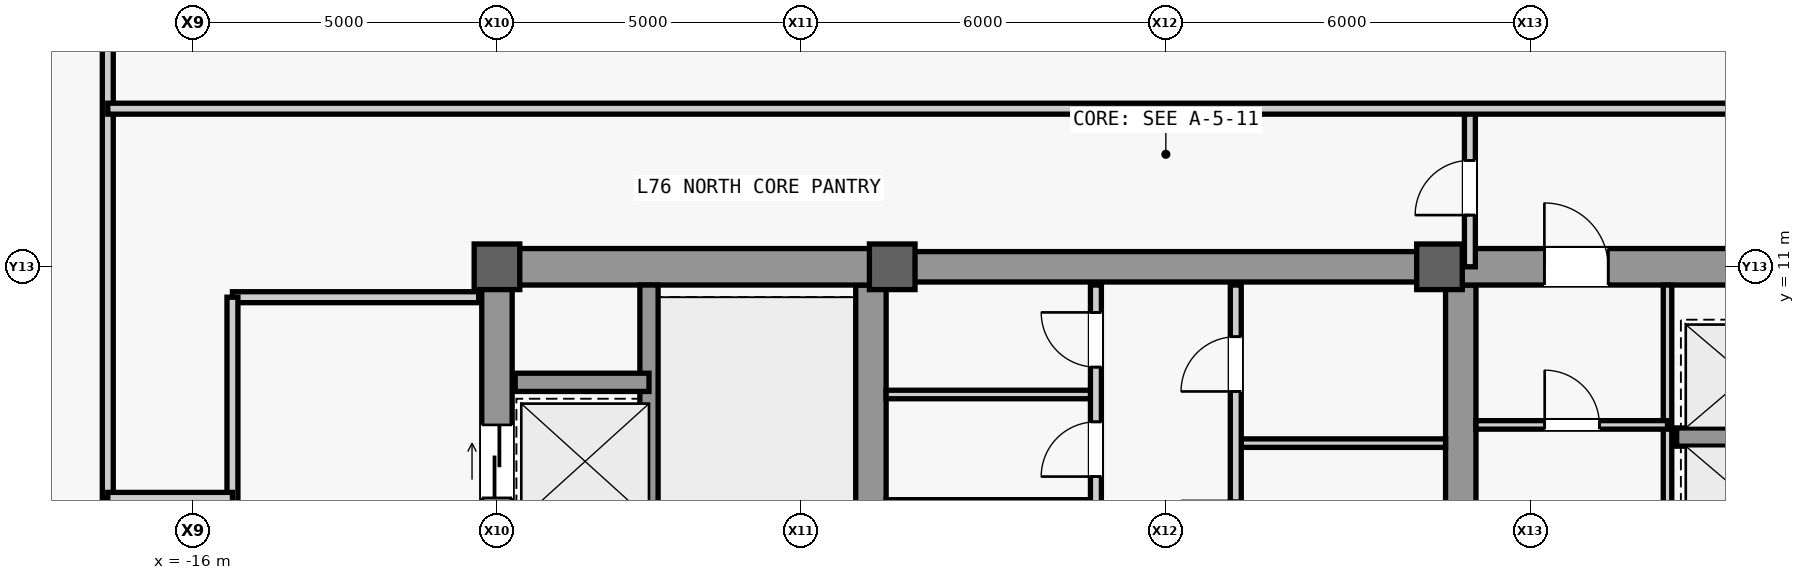
"""IFC4 building model, lengths in metres.
Left out: names, types, materials, properties, quantities, classifications, styles, units other than length and angle.
Written with IfcOpenShell. Run it as: python <this file> out.ifc"""

import sys

from ifc_helpers import new_model, si_unit, direction, frame, frame_2d, origin, origin_2d, place, context, subcontext, project, spatial, rectangle, extrude, source, transform, mapped, element, fill, save


model = new_model("IFC4")
c1 = context("Model", 3, precision=1e-05, world=origin(), true_north=direction((0.0, 1.0)))
c2 = subcontext(c1, "Body", "Model", "MODEL_VIEW")
j1 = project(units=[si_unit("LENGTHUNIT", "METRE"), si_unit("PLANEANGLEUNIT", "RADIAN")], contexts=[c1])
p1 = place(None, origin())
s1 = spatial("IfcSite", under=j1, at=p1, CompositionType="ELEMENT")
p2 = place(p1, origin())
s2 = spatial("IfcBuilding", under=s1, at=p2, CompositionType="ELEMENT")
p3 = place(p2, frame((0.0, 0.0, 321.5)))
s3 = spatial("IfcBuildingStorey", under=s2, at=p3, CompositionType="ELEMENT", Elevation=321.5)
m1 = source(origin(), c2, "Body", "SweptSolid", [
    extrude(rectangle(XDim=22.0, YDim=0.5, at=frame_2d((11.0, 0.0))), origin(), (0.0, 0.0, 1.0), 4.54),
])
p4 = place(p3, frame((-11.0, -11.0, 0.0), z_axis=(0.0, 0.0, 1.0), x_axis=(0.0, 1.0, 0.0)))
e1 = element("IfcWall", 1, at=p4, inside=s3, PredefinedType="SHEAR", context=c2, shape_type="MappedRepresentation", body=[
    mapped(m1, transform((0.0, 0.0, 0.0), scale=1.0)),
])
m2 = source(origin(), c2, "Body", "SweptSolid", [
    extrude(rectangle(XDim=1.1, YDim=2.2, at=frame_2d((0.55, 1.1))), frame((0.0, 0.26, 0.0), z_axis=(0.0, -1.0, 0.0), x_axis=(1.0, 0.0, 0.0)), (0.0, 0.0, 1.0), 0.52),
])
p5 = place(p4, frame((0.8, 0.0, 0.0)))
e2 = element("IfcOpeningElement", 2, at=p5, cuts=e1, PredefinedType="OPENING", context=c2, shape_type="MappedRepresentation", body=[
    mapped(m2, transform((0.0, 0.0, 0.0), scale=1.0)),
])
p6 = place(p4, frame((12.5, 0.0, 0.0)))
e3 = element("IfcOpeningElement", 3, at=p6, cuts=e1, PredefinedType="OPENING", context=c2, shape_type="MappedRepresentation", body=[
    mapped(m2, transform((0.0, 0.0, 0.0), scale=1.0)),
])
m3 = source(origin(), c2, "Body", "SweptSolid", [
    extrude(rectangle(XDim=0.9, YDim=2.15, at=frame_2d((0.45, 1.075))), frame((0.0, 0.26, 0.0), z_axis=(0.0, -1.0, 0.0), x_axis=(1.0, 0.0, 0.0)), (0.0, 0.0, 1.0), 0.52),
])
p7 = place(p4, frame((6.2, 0.0, 0.0)))
e4 = element("IfcOpeningElement", 4, at=p7, cuts=e1, PredefinedType="OPENING", context=c2, shape_type="MappedRepresentation", body=[
    mapped(m3, transform((0.0, 0.0, 0.0), scale=1.0)),
])
p8 = place(p4, frame((8.525, 0.0, 0.0)))
e5 = element("IfcOpeningElement", 5, at=p8, cuts=e1, PredefinedType="OPENING", context=c2, shape_type="MappedRepresentation", body=[
    mapped(m3, transform((0.0, 0.0, 0.0), scale=1.0)),
])
m4 = source(origin(), c2, "Body", "SweptSolid", [
    extrude(rectangle(XDim=1.2, YDim=2.3, at=frame_2d((0.6, 1.15))), frame((0.0, 0.26, 0.0), z_axis=(0.0, -1.0, 0.0), x_axis=(1.0, 0.0, 0.0)), (0.0, 0.0, 1.0), 0.52),
])
p9 = place(p4, frame((14.6, 0.0, 0.0)))
e6 = element("IfcOpeningElement", 6, at=p9, cuts=e1, PredefinedType="OPENING", context=c2, shape_type="MappedRepresentation", body=[
    mapped(m4, transform((0.0, 0.0, 0.0), scale=1.0)),
])
p10 = place(p4, frame((18.2, 0.0, 0.0)))
e7 = element("IfcOpeningElement", 7, at=p10, cuts=e1, PredefinedType="OPENING", context=c2, shape_type="MappedRepresentation", body=[
    mapped(m4, transform((0.0, 0.0, 0.0), scale=1.0)),
])
m5 = source(origin(), c2, "Body", "SweptSolid", [
    extrude(rectangle(XDim=1.3, YDim=2.3, at=frame_2d((0.65, 1.15))), frame((0.0, 0.26, 0.0), z_axis=(0.0, -1.0, 0.0), x_axis=(1.0, 0.0, 0.0)), (0.0, 0.0, 1.0), 0.52),
])
p11 = place(p4, frame((2.7, 0.0, 0.0)))
e8 = element("IfcOpeningElement", 8, at=p11, cuts=e1, PredefinedType="OPENING", context=c2, shape_type="MappedRepresentation", body=[
    mapped(m5, transform((0.0, 0.0, 0.0), scale=1.0)),
])
m6 = source(origin(), c2, "Body", "SweptSolid", [
    extrude(rectangle(XDim=21.4, YDim=0.5, at=frame_2d((10.7, 0.0))), origin(), (0.0, 0.0, 1.0), 4.54),
])
for number, where, z_axis, x_axis in (
    (9, (-4.85, -10.7, 0.0), (0.0, 0.0, 1.0), (0.0, 1.0, 0.0)),
    (10, (4.85, -10.7, 0.0), (0.0, 0.0, 1.0), (0.0, 1.0, 0.0)),
):
    element("IfcWall", number, at=place(p3, frame(where, z_axis=z_axis, x_axis=x_axis)), inside=s3, PredefinedType="SHEAR", context=c2, shape_type="MappedRepresentation", body=[
        mapped(m6, transform((0.0, 0.0, 0.0), scale=1.0)),
    ])
m7 = source(origin(), c2, "Body", "SweptSolid", [
    extrude(rectangle(XDim=5.9, YDim=0.6, at=frame_2d((2.95, 0.0))), origin(), (0.0, 0.0, 1.0), 4.54),
])
p12 = place(p3, frame((-10.75, 11.0, 0.0), z_axis=(0.0, 0.0, 1.0), x_axis=(1.0, 0.0, 0.0)))
e11 = element("IfcWall", 11, at=p12, inside=s3, PredefinedType="SHEAR", context=c2, shape_type="MappedRepresentation", body=[
    mapped(m7, transform((0.0, 0.0, 0.0), scale=1.0)),
])
p13 = place(p3, frame((4.85, 11.0, 0.0), z_axis=(0.0, 0.0, 1.0), x_axis=(1.0, 0.0, 0.0)))
e12 = element("IfcWall", 12, at=p13, inside=s3, PredefinedType="SHEAR", context=c2, shape_type="MappedRepresentation", body=[
    mapped(m7, transform((0.0, 0.0, 0.0), scale=1.0)),
])
m8 = source(origin(), c2, "Body", "SweptSolid", [
    extrude(rectangle(XDim=1.05, YDim=2.2, at=frame_2d((0.525, 1.1))), frame((0.0, 0.31, 0.0), z_axis=(0.0, -1.0, 0.0), x_axis=(1.0, 0.0, 0.0)), (0.0, 0.0, 1.0), 0.62),
])
p14 = place(p13, frame((1.375, 0.0, 0.0)))
e13 = element("IfcOpeningElement", 13, at=p14, cuts=e12, PredefinedType="OPENING", context=c2, shape_type="MappedRepresentation", body=[
    mapped(m8, transform((0.0, 0.0, 0.0), scale=1.0)),
])
m9 = source(origin(), c2, "Body", "SweptSolid", [
    extrude(rectangle(XDim=9.2, YDim=0.5, at=frame_2d((4.6, 0.0))), origin(), (0.0, 0.0, 1.0), 4.54),
])
p15 = place(p3, frame((-4.6, 11.0, 0.0), z_axis=(0.0, 0.0, 1.0), x_axis=(1.0, 0.0, 0.0)))
e14 = element("IfcWall", 14, at=p15, inside=s3, PredefinedType="SHEAR", context=c2, shape_type="MappedRepresentation", body=[
    mapped(m9, transform((0.0, 0.0, 0.0), scale=1.0)),
])
m10 = source(origin(), c2, "Body", "SweptSolid", [
    extrude(rectangle(XDim=0.75, YDim=0.75, at=origin_2d()), origin(), (0.0, 0.0, 1.0), 4.8),
])
for number, where, z_axis, x_axis in (
    (15, (-11.0, 11.0, 0.0), (0.0, 0.0, 1.0), (1.0, 0.0, 0.0)),
    (16, (-4.5, 11.0, 0.0), (0.0, 0.0, 1.0), (1.0, 0.0, 0.0)),
    (17, (4.5, 11.0, 0.0), (0.0, 0.0, 1.0), (1.0, 0.0, 0.0)),
):
    element("IfcColumn", number, at=place(p3, frame(where, z_axis=z_axis, x_axis=x_axis)), inside=s3, PredefinedType="COLUMN", context=c2, shape_type="MappedRepresentation", body=[
        mapped(m10, transform((0.0, 0.0, 0.0), scale=1.0)),
    ])
m11 = source(origin(), c2, "Body", "SweptSolid", [
    extrude(rectangle(XDim=7.75, YDim=0.3, at=frame_2d((3.875, 0.0))), origin(), (0.0, 0.0, 1.0), 4.54),
])
p16 = place(p3, frame((-8.5, 2.95, 0.0), z_axis=(0.0, 0.0, 1.0), x_axis=(0.0, 1.0, 0.0)))
e18 = element("IfcWall", 18, at=p16, inside=s3, PredefinedType="SHEAR", context=c2, shape_type="MappedRepresentation", body=[
    mapped(m11, transform((0.0, 0.0, 0.0), scale=1.0)),
])
m12 = source(origin(), c2, "Body", "SweptSolid", [
    extrude(rectangle(XDim=2.2, YDim=0.3, at=frame_2d((1.1, 0.0))), origin(), (0.0, 0.0, 1.0), 4.54),
])
p17 = place(p3, frame((-10.7, 9.1, 0.0), z_axis=(0.0, 0.0, 1.0), x_axis=(1.0, 0.0, 0.0)))
e19 = element("IfcWall", 19, at=p17, inside=s3, PredefinedType="SHEAR", context=c2, shape_type="MappedRepresentation", body=[
    mapped(m12, transform((0.0, 0.0, 0.0), scale=1.0)),
])
m13 = source(origin(), c2, "Body", "SweptSolid", [
    extrude(rectangle(XDim=2.3, YDim=0.3, at=frame_2d((1.15, 0.0))), origin(), (0.0, 0.0, 1.0), 4.54),
])
p18 = place(p3, frame((8.4, 8.2, 0.0), z_axis=(0.0, 0.0, 1.0), x_axis=(1.0, 0.0, 0.0)))
e20 = element("IfcWall", 20, at=p18, inside=s3, PredefinedType="SHEAR", context=c2, shape_type="MappedRepresentation", body=[
    mapped(m13, transform((0.0, 0.0, 0.0), scale=1.0)),
])
m14 = source(origin(), c2, "Body", "SweptSolid", [
    extrude(rectangle(XDim=9.4, YDim=0.14, at=frame_2d((4.7, 0.0))), origin(), (0.0, 0.0, 1.0), 4.54),
])
p19 = place(p3, frame((8.25, 1.3, 0.0), z_axis=(0.0, 0.0, 1.0), x_axis=(0.0, 1.0, 0.0)))
e21 = element("IfcWall", 21, at=p19, inside=s3, PredefinedType="PARTITIONING", context=c2, shape_type="MappedRepresentation", body=[
    mapped(m14, transform((0.0, 0.0, 0.0), scale=1.0)),
])
m15 = source(origin(), c2, "Body", "SweptSolid", [
    extrude(rectangle(XDim=3.15, YDim=0.14, at=frame_2d((1.575, 0.0))), origin(), (0.0, 0.0, 1.0), 4.54),
])
p20 = place(p3, frame((5.1, 8.4, 0.0), z_axis=(0.0, 0.0, 1.0), x_axis=(1.0, 0.0, 0.0)))
e22 = element("IfcWall", 22, at=p20, inside=s3, PredefinedType="PARTITIONING", context=c2, shape_type="MappedRepresentation", body=[
    mapped(m15, transform((0.0, 0.0, 0.0), scale=1.0)),
])
m16 = source(origin(), c2, "Body", "SweptSolid", [
    extrude(rectangle(XDim=0.9, YDim=2.15, at=frame_2d((0.45, 1.075))), frame((0.0, 0.08, 0.0), z_axis=(0.0, -1.0, 0.0), x_axis=(1.0, 0.0, 0.0)), (0.0, 0.0, 1.0), 0.16),
])
p21 = place(p20, frame((1.13, 0.0, 0.0)))
e23 = element("IfcOpeningElement", 23, at=p21, cuts=e22, PredefinedType="OPENING", context=c2, shape_type="MappedRepresentation", body=[
    mapped(m16, transform((0.0, 0.0, 0.0), scale=1.0)),
])
m17 = source(origin(), c2, "Body", "SweptSolid", [
    extrude(rectangle(XDim=4.05, YDim=0.18, at=frame_2d((2.025, 0.0))), origin(), (0.0, 0.0, 1.0), 4.54),
])
p22 = place(p3, frame((-15.35, 10.5, 0.0), z_axis=(0.0, 0.0, 1.0), x_axis=(1.0, 0.0, 0.0)))
e24 = element("IfcWall", 24, at=p22, inside=s3, PredefinedType="PARTITIONING", context=c2, shape_type="MappedRepresentation", body=[
    mapped(m17, transform((0.0, 0.0, 0.0), scale=1.0)),
])
m18 = source(origin(), c2, "Body", "SweptSolid", [
    extrude(rectangle(XDim=16.6, YDim=0.18, at=frame_2d((8.3, 0.0))), origin(), (0.0, 0.0, 1.0), 4.54),
])
p23 = place(p3, frame((-15.35, -6.1, 0.0), z_axis=(0.0, 0.0, 1.0), x_axis=(0.0, 1.0, 0.0)))
e25 = element("IfcWall", 25, at=p23, inside=s3, PredefinedType="PARTITIONING", context=c2, shape_type="MappedRepresentation", body=[
    mapped(m18, transform((0.0, 0.0, 0.0), scale=1.0)),
])
m19 = source(origin(), c2, "Body", "SweptSolid", [
    extrude(rectangle(XDim=1.8, YDim=2.25, at=frame_2d((0.9, 1.125))), frame((0.0, 0.1, 0.0), z_axis=(0.0, -1.0, 0.0), x_axis=(1.0, 0.0, 0.0)), (0.0, 0.0, 1.0), 0.2),
])
p24 = place(p23, frame((2.7, 0.0, 0.0)))
e26 = element("IfcOpeningElement", 26, at=p24, cuts=e25, PredefinedType="OPENING", context=c2, shape_type="MappedRepresentation", body=[
    mapped(m19, transform((0.0, 0.0, 0.0), scale=1.0)),
])
p25 = place(p23, frame((11.0, 0.0, 0.0)))
e27 = element("IfcOpeningElement", 27, at=p25, cuts=e25, PredefinedType="OPENING", context=c2, shape_type="MappedRepresentation", body=[
    mapped(m19, transform((0.0, 0.0, 0.0), scale=1.0)),
])
m20 = source(origin(), c2, "Body", "SweptSolid", [
    extrude(rectangle(XDim=3.45, YDim=0.14, at=frame_2d((1.725, 0.0))), origin(), (0.0, 0.0, 1.0), 4.54),
])
for number, where, z_axis, x_axis in (
    (28, (-4.6, 7.1, 0.0), (0.0, 0.0, 1.0), (1.0, 0.0, 0.0)),
    (29, (-4.6, 8.9, 0.0), (0.0, 0.0, 1.0), (1.0, 0.0, 0.0)),
):
    element("IfcWall", number, at=place(p3, frame(where, z_axis=z_axis, x_axis=x_axis)), inside=s3, PredefinedType="PARTITIONING", context=c2, shape_type="MappedRepresentation", body=[
        mapped(m20, transform((0.0, 0.0, 0.0), scale=1.0)),
    ])
m21 = source(origin(), c2, "Body", "SweptSolid", [
    extrude(rectangle(XDim=5.4, YDim=0.18, at=frame_2d((2.7, 0.0))), origin(), (0.0, 0.0, 1.0), 4.54),
])
p26 = place(p3, frame((-1.15, 5.3, 0.0), z_axis=(0.0, 0.0, 1.0), x_axis=(0.0, 1.0, 0.0)))
e30 = element("IfcWall", 30, at=p26, inside=s3, PredefinedType="PARTITIONING", context=c2, shape_type="MappedRepresentation", body=[
    mapped(m21, transform((0.0, 0.0, 0.0), scale=1.0)),
])
m22 = source(origin(), c2, "Body", "SweptSolid", [
    extrude(rectangle(XDim=0.9, YDim=2.15, at=frame_2d((0.45, 1.075))), frame((0.0, 0.1, 0.0), z_axis=(0.0, -1.0, 0.0), x_axis=(1.0, 0.0, 0.0)), (0.0, 0.0, 1.0), 0.2),
])
p27 = place(p26, frame((0.45, 0.0, 0.0)))
e31 = element("IfcOpeningElement", 31, at=p27, cuts=e30, PredefinedType="OPENING", context=c2, shape_type="MappedRepresentation", body=[
    mapped(m22, transform((0.0, 0.0, 0.0), scale=1.0)),
])
p28 = place(p26, frame((2.25, 0.0, 0.0)))
e32 = element("IfcOpeningElement", 32, at=p28, cuts=e30, PredefinedType="OPENING", context=c2, shape_type="MappedRepresentation", body=[
    mapped(m22, transform((0.0, 0.0, 0.0), scale=1.0)),
])
p29 = place(p26, frame((4.05, 0.0, 0.0)))
e33 = element("IfcOpeningElement", 33, at=p29, cuts=e30, PredefinedType="OPENING", context=c2, shape_type="MappedRepresentation", body=[
    mapped(m22, transform((0.0, 0.0, 0.0), scale=1.0)),
])
p30 = place(p3, frame((1.15, 8.1, 0.0), z_axis=(0.0, 0.0, 1.0), x_axis=(1.0, 0.0, 0.0)))
e34 = element("IfcWall", 34, at=p30, inside=s3, PredefinedType="PARTITIONING", context=c2, shape_type="MappedRepresentation", body=[
    mapped(m20, transform((0.0, 0.0, 0.0), scale=1.0)),
])
p31 = place(p3, frame((1.15, 5.3, 0.0), z_axis=(0.0, 0.0, 1.0), x_axis=(0.0, 1.0, 0.0)))
e35 = element("IfcWall", 35, at=p31, inside=s3, PredefinedType="PARTITIONING", context=c2, shape_type="MappedRepresentation", body=[
    mapped(m21, transform((0.0, 0.0, 0.0), scale=1.0)),
])
p32 = place(p31, frame((0.95, 0.0, 0.0)))
e36 = element("IfcOpeningElement", 36, at=p32, cuts=e35, PredefinedType="OPENING", context=c2, shape_type="MappedRepresentation", body=[
    mapped(m22, transform((0.0, 0.0, 0.0), scale=1.0)),
])
p33 = place(p31, frame((3.65, 0.0, 0.0)))
e37 = element("IfcOpeningElement", 37, at=p33, cuts=e35, PredefinedType="OPENING", context=c2, shape_type="MappedRepresentation", body=[
    mapped(m22, transform((0.0, 0.0, 0.0), scale=1.0)),
])
m23 = source(origin(), c2, "Body", "SweptSolid", [
    extrude(rectangle(XDim=8.4, YDim=0.18, at=frame_2d((4.2, 0.0))), origin(), (0.0, 0.0, 1.0), 4.54),
])
p34 = place(p3, frame((-17.4, 7.2, 0.0), z_axis=(0.0, 0.0, 1.0), x_axis=(0.0, 1.0, 0.0)))
e38 = element("IfcWall", 38, at=p34, inside=s3, PredefinedType="PARTITIONING", context=c2, shape_type="MappedRepresentation", body=[
    mapped(m23, transform((0.0, 0.0, 0.0), scale=1.0)),
])
m24 = source(origin(), c2, "Body", "SweptSolid", [
    extrude(rectangle(XDim=2.05, YDim=0.18, at=frame_2d((1.025, 0.0))), origin(), (0.0, 0.0, 1.0), 4.54),
])
p35 = place(p3, frame((-17.4, 7.2, 0.0), z_axis=(0.0, 0.0, 1.0), x_axis=(1.0, 0.0, 0.0)))
e39 = element("IfcWall", 39, at=p35, inside=s3, PredefinedType="PARTITIONING", context=c2, shape_type="MappedRepresentation", body=[
    mapped(m24, transform((0.0, 0.0, 0.0), scale=1.0)),
])
m25 = source(origin(), c2, "Body", "SweptSolid", [
    extrude(rectangle(XDim=2.6, YDim=0.18, at=frame_2d((1.3, 0.0))), origin(), (0.0, 0.0, 1.0), 4.54),
])
p36 = place(p3, frame((5.0, 11.0, 0.0), z_axis=(0.0, 0.0, 1.0), x_axis=(0.0, 1.0, 0.0)))
e40 = element("IfcWall", 40, at=p36, inside=s3, PredefinedType="PARTITIONING", context=c2, shape_type="MappedRepresentation", body=[
    mapped(m25, transform((0.0, 0.0, 0.0), scale=1.0)),
])
p37 = place(p36, frame((0.85, 0.0, 0.0)))
e41 = element("IfcOpeningElement", 41, at=p37, cuts=e40, PredefinedType="OPENING", context=c2, shape_type="MappedRepresentation", body=[
    mapped(m22, transform((0.0, 0.0, 0.0), scale=1.0)),
])
m26 = source(origin(), c2, "Body", "SweptSolid", [
    extrude(rectangle(XDim=32.75, YDim=0.18, at=frame_2d((16.375, 0.0))), origin(), (0.0, 0.0, 1.0), 4.54),
])
p38 = place(p3, frame((-17.4, 13.6, 0.0), z_axis=(0.0, 0.0, 1.0), x_axis=(1.0, 0.0, 0.0)))
e42 = element("IfcWall", 42, at=p38, inside=s3, PredefinedType="PARTITIONING", context=c2, shape_type="MappedRepresentation", body=[
    mapped(m26, transform((0.0, 0.0, 0.0), scale=1.0)),
])
m27 = source(origin(), c2, "Body", "SweptSolid", [
    extrude(rectangle(XDim=1.05, YDim=2.2, at=frame_2d((0.525, 1.1))), frame((0.0, 0.1, 0.0), z_axis=(0.0, -1.0, 0.0), x_axis=(1.0, 0.0, 0.0)), (0.0, 0.0, 1.0), 0.2),
])
p39 = place(p38, frame((27.075, 0.0, 0.0)))
e43 = element("IfcOpeningElement", 43, at=p39, cuts=e42, PredefinedType="OPENING", context=c2, shape_type="MappedRepresentation", body=[
    mapped(m27, transform((0.0, 0.0, 0.0), scale=1.0)),
])
m28 = source(origin(), c2, "Body", "SweptSolid", [
    extrude(rectangle(XDim=1.05, YDim=2.2, at=frame_2d((0.525, 1.1))), frame((0.0, 0.025, 0.0), z_axis=(0.0, -1.0, 0.0), x_axis=(1.0, 0.0, 0.0)), (0.0, 0.0, 1.0), 0.05),
])
p40 = place(p14, origin())
e44 = element("IfcDoor", 44, at=p40, inside=s3, OperationType="SINGLE_SWING_LEFT", PredefinedType="DOOR", context=c2, shape_type="MappedRepresentation", body=[
    mapped(m28, transform((0.0, 0.0, 0.0), scale=1.0)),
])
fill(e13, e44)
m29 = source(origin(), c2, "Body", "SweptSolid", [
    extrude(rectangle(XDim=0.9, YDim=2.15, at=frame_2d((0.45, 1.075))), frame((0.0, 0.025, 0.0), z_axis=(0.0, -1.0, 0.0), x_axis=(1.0, 0.0, 0.0)), (0.0, 0.0, 1.0), 0.05),
])
p41 = place(p21, origin())
e45 = element("IfcDoor", 45, at=p41, inside=s3, OperationType="SINGLE_SWING_LEFT", PredefinedType="DOOR", context=c2, shape_type="MappedRepresentation", body=[
    mapped(m29, transform((0.0, 0.0, 0.0), scale=1.0)),
])
fill(e23, e45)
p42 = place(p28, origin())
e46 = element("IfcDoor", 46, at=p42, inside=s3, OperationType="SINGLE_SWING_LEFT", PredefinedType="DOOR", context=c2, shape_type="MappedRepresentation", body=[
    mapped(m29, transform((0.0, 0.0, 0.0), scale=1.0)),
])
fill(e32, e46)
p43 = place(p29, origin())
e47 = element("IfcDoor", 47, at=p43, inside=s3, OperationType="SINGLE_SWING_RIGHT", PredefinedType="DOOR", context=c2, shape_type="MappedRepresentation", body=[
    mapped(m29, transform((0.0, 0.0, 0.0), scale=1.0)),
])
fill(e33, e47)
p44 = place(p33, origin())
e48 = element("IfcDoor", 48, at=p44, inside=s3, OperationType="SINGLE_SWING_LEFT", PredefinedType="DOOR", context=c2, shape_type="MappedRepresentation", body=[
    mapped(m29, transform((0.0, 0.0, 0.0), scale=1.0)),
])
fill(e37, e48)
p45 = place(p37, origin())
e49 = element("IfcDoor", 49, at=p45, inside=s3, OperationType="SINGLE_SWING_LEFT", PredefinedType="DOOR", context=c2, shape_type="MappedRepresentation", body=[
    mapped(m29, transform((0.0, 0.0, 0.0), scale=1.0)),
])
fill(e41, e49)
m30 = source(origin(), c2, "Body", "SweptSolid", [
    extrude(rectangle(XDim=1.2, YDim=2.3, at=frame_2d((0.6, 1.15))), frame((0.0, 0.025, 0.0), z_axis=(0.0, -1.0, 0.0), x_axis=(1.0, 0.0, 0.0)), (0.0, 0.0, 1.0), 0.05),
])
p46 = place(p10, origin())
e50 = element("IfcDoor", 50, at=p46, inside=s3, OperationType="SLIDING_TO_LEFT", PredefinedType="DOOR", context=c2, shape_type="MappedRepresentation", body=[
    mapped(m30, transform((0.0, 0.0, 0.0), scale=1.0)),
])
fill(e7, e50)
save(model, sys.argv[1])
